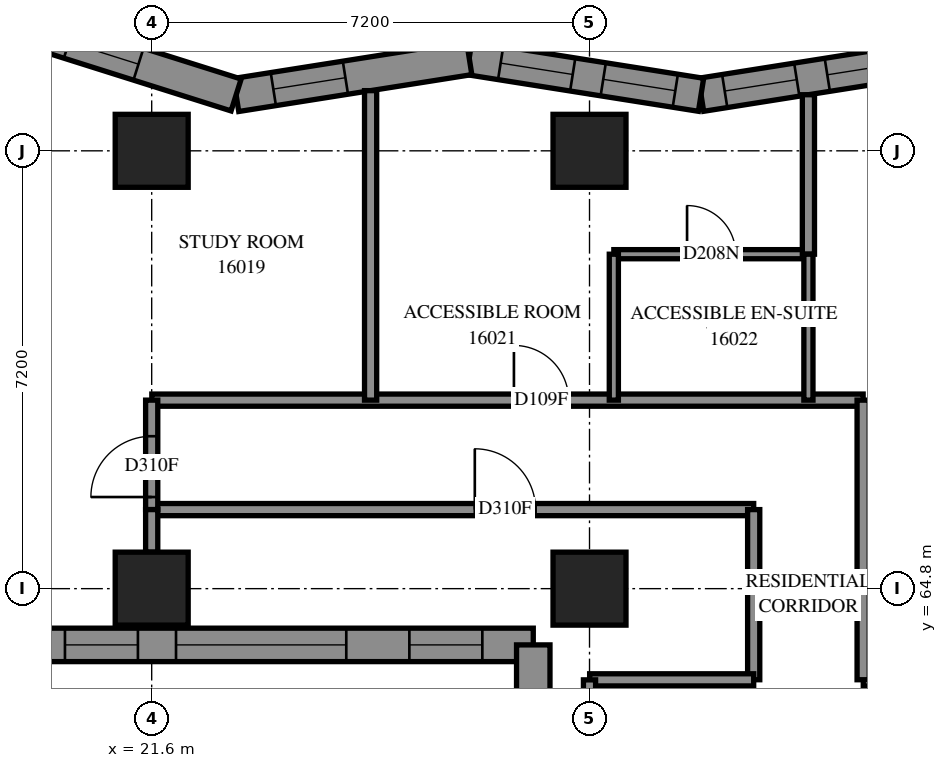
"""IFC4 building model, lengths in metres.
Left out: names, types, materials, properties, quantities, classifications, styles, units other than length and angle.
Written with IfcOpenShell. Run it as: python <this file> out.ifc"""

import sys

from ifc_helpers import new_model, si_unit, direction, frame, frame_2d, origin, origin_2d, place, context, subcontext, project, spatial, polyline, rectangle, outline, extrude, element, fill, save


model = new_model("IFC4")
c1 = context("Model", 3, precision=1e-05, world=origin(), true_north=direction((0.0, 1.0)))
c2 = subcontext(c1, "Body", "Model", "MODEL_VIEW")
j1 = project(units=[si_unit("LENGTHUNIT", "METRE"), si_unit("PLANEANGLEUNIT", "RADIAN")], contexts=[c1])
p1 = place(None, origin())
s1 = spatial("IfcSite", under=j1, at=p1, CompositionType="ELEMENT")
p2 = place(p1, origin())
s2 = spatial("IfcBuilding", under=s1, at=p2, CompositionType="ELEMENT")
p3 = place(p2, frame((0.0, 0.0, 61.0)))
s3 = spatial("IfcBuildingStorey", under=s2, at=p3, CompositionType="ELEMENT", Elevation=61.0)
for number, where, z_axis, x_axis in (
    (1, (21.6, 64.8, 0.0), (0.0, 0.0, 1.0), (1.0, 0.0, 0.0)),
    (2, (21.6, 72.0, 0.0), (0.0, 0.0, 1.0), (1.0, 0.0, 0.0)),
    (3, (28.8, 64.8, 0.0), (0.0, 0.0, 1.0), (1.0, 0.0, 0.0)),
    (4, (28.8, 72.0, 0.0), (0.0, 0.0, 1.0), (1.0, 0.0, 0.0)),
):
    element("IfcColumn", number, at=place(p3, frame(where, z_axis=z_axis, x_axis=x_axis)), inside=s3, PredefinedType="COLUMN", context=c2, shape_type="SweptSolid", body=[
        extrude(rectangle(XDim=1.2, YDim=1.2, at=origin_2d()), origin(), (0.0, 0.0, 1.0), 3.1),
    ])
p4 = place(p3, frame((34.447, 73.525, 0.0), z_axis=(0.0, 0.0, 1.0), x_axis=(-0.9877213372, -0.1562259905, 0.0)))
e5 = element("IfcWall", 5, at=p4, inside=s3, PredefinedType="SOLIDWALL", context=c2, shape_type="SweptSolid", body=[
    extrude(outline(polyline([(-0.043, -0.275), (3.816, -0.275), (3.903, 0.275), (0.043, 0.275), (-0.043, -0.275)])), origin(), (0.0, 0.0, 1.0), 3.1),
])
p5 = place(p4, frame((0.558, 0.0, 0.5)))
e6 = element("IfcOpeningElement", 6, at=p5, cuts=e5, PredefinedType="OPENING", context=c2, shape_type="SweptSolid", body=[
    extrude(rectangle(XDim=1.2, YDim=2.45, at=frame_2d((0.6, 1.225))), frame((0.0, 0.285, 0.0), z_axis=(0.0, -1.0, 0.0), x_axis=(1.0, 0.0, 0.0)), (0.0, 0.0, 1.0), 0.57),
])
p6 = place(p4, frame((2.266, 0.0, 0.5)))
e7 = element("IfcOpeningElement", 7, at=p6, cuts=e5, PredefinedType="OPENING", context=c2, shape_type="SweptSolid", body=[
    extrude(rectangle(XDim=1.2, YDim=2.45, at=frame_2d((0.6, 1.225))), frame((0.0, 0.285, 0.0), z_axis=(0.0, -1.0, 0.0), x_axis=(1.0, 0.0, 0.0)), (0.0, 0.0, 1.0), 0.57),
])
p7 = place(p3, frame((30.634, 72.922, 0.0), z_axis=(0.0, 0.0, 1.0), x_axis=(-0.9877213372, 0.1562259905, 0.0)))
e8 = element("IfcWall", 8, at=p7, inside=s3, PredefinedType="SOLIDWALL", context=c2, shape_type="SweptSolid", body=[
    extrude(outline(polyline([(0.043, -0.275), (3.903, -0.275), (3.816, 0.275), (-0.043, 0.275), (0.043, -0.275)])), origin(), (0.0, 0.0, 1.0), 3.1),
])
p8 = place(p7, frame((0.428, 0.0, 0.5)))
e9 = element("IfcOpeningElement", 9, at=p8, cuts=e8, PredefinedType="OPENING", context=c2, shape_type="SweptSolid", body=[
    extrude(rectangle(XDim=1.2, YDim=2.45, at=frame_2d((0.6, 1.225))), frame((0.0, 0.285, 0.0), z_axis=(0.0, -1.0, 0.0), x_axis=(1.0, 0.0, 0.0)), (0.0, 0.0, 1.0), 0.57),
])
p9 = place(p7, frame((2.137, 0.0, 0.5)))
e10 = element("IfcOpeningElement", 10, at=p9, cuts=e8, PredefinedType="OPENING", context=c2, shape_type="SweptSolid", body=[
    extrude(rectangle(XDim=1.2, YDim=2.45, at=frame_2d((0.6, 1.225))), frame((0.0, 0.285, 0.0), z_axis=(0.0, -1.0, 0.0), x_axis=(1.0, 0.0, 0.0)), (0.0, 0.0, 1.0), 0.57),
])
p10 = place(p3, frame((26.822, 73.525, 0.0), z_axis=(0.0, 0.0, 1.0), x_axis=(-0.9877221932, -0.1562205785, 0.0)))
e11 = element("IfcWall", 11, at=p10, inside=s3, PredefinedType="SOLIDWALL", context=c2, shape_type="SweptSolid", body=[
    extrude(outline(polyline([(-0.043, -0.275), (3.816, -0.275), (3.946, 0.275), (0.043, 0.275), (-0.043, -0.275)])), origin(), (0.0, 0.0, 1.0), 3.1),
])
p11 = place(p10, frame((2.062, 0.0, 0.5)))
e12 = element("IfcOpeningElement", 12, at=p11, cuts=e11, PredefinedType="OPENING", context=c2, shape_type="SweptSolid", body=[
    extrude(rectangle(XDim=1.2, YDim=2.45, at=frame_2d((0.6, 1.225))), frame((0.0, 0.285, 0.0), z_axis=(0.0, -1.0, 0.0), x_axis=(1.0, 0.0, 0.0)), (0.0, 0.0, 1.0), 0.57),
])
p12 = place(p3, frame((22.988, 72.918, 0.0), z_axis=(0.0, 0.0, 1.0), x_axis=(-0.9536482224, 0.3009236912, 0.0)))
e13 = element("IfcWall", 13, at=p12, inside=s3, PredefinedType="SOLIDWALL", context=c2, shape_type="SweptSolid", body=[
    extrude(outline(polyline([(0.065, -0.275), (4.062, -0.275), (3.312, 0.275), (-0.065, 0.275), (0.065, -0.275)])), origin(), (0.0, 0.0, 1.0), 3.1),
])
p13 = place(p12, frame((1.684, 0.0, 0.5)))
e14 = element("IfcOpeningElement", 14, at=p13, cuts=e13, PredefinedType="OPENING", context=c2, shape_type="SweptSolid", body=[
    extrude(rectangle(XDim=1.2, YDim=2.45, at=frame_2d((0.6, 1.225))), frame((0.0, 0.285, 0.0), z_axis=(0.0, -1.0, 0.0), x_axis=(1.0, 0.0, 0.0)), (0.0, 0.0, 1.0), 0.57),
])
p14 = place(p3, frame((19.472, 63.875, 0.0), z_axis=(0.0, 0.0, 1.0), x_axis=(1.0, 0.0, 0.0)))
e15 = element("IfcWall", 15, at=p14, inside=s3, PredefinedType="SOLIDWALL", context=c2, shape_type="SweptSolid", body=[
    extrude(outline(polyline([(-0.275, -0.275), (8.128, -0.275), (8.678, 0.275), (0.275, 0.275), (-0.275, -0.275)])), origin(), (0.0, 0.0, 1.0), 3.1),
])
p15 = place(p14, frame((2.528, 0.0, 0.5)))
e16 = element("IfcOpeningElement", 16, at=p15, cuts=e15, PredefinedType="OPENING", context=c2, shape_type="SweptSolid", body=[
    extrude(rectangle(XDim=2.8, YDim=2.45, at=frame_2d((1.4, 1.225))), frame((0.0, 0.285, 0.0), z_axis=(0.0, -1.0, 0.0), x_axis=(1.0, 0.0, 0.0)), (0.0, 0.0, 1.0), 0.57),
])
p16 = place(p14, frame((0.702, 0.0, 0.5)))
e17 = element("IfcOpeningElement", 17, at=p16, cuts=e15, PredefinedType="OPENING", context=c2, shape_type="SweptSolid", body=[
    extrude(rectangle(XDim=1.2, YDim=2.45, at=frame_2d((0.6, 1.225))), frame((0.0, 0.285, 0.0), z_axis=(0.0, -1.0, 0.0), x_axis=(1.0, 0.0, 0.0)), (0.0, 0.0, 1.0), 0.57),
])
p17 = place(p14, frame((6.365, 0.0, 0.5)))
e18 = element("IfcOpeningElement", 18, at=p17, cuts=e15, PredefinedType="OPENING", context=c2, shape_type="SweptSolid", body=[
    extrude(rectangle(XDim=1.2, YDim=2.45, at=frame_2d((0.6, 1.225))), frame((0.0, 0.285, 0.0), z_axis=(0.0, -1.0, 0.0), x_axis=(1.0, 0.0, 0.0)), (0.0, 0.0, 1.0), 0.57),
])
p18 = place(p3, frame((27.875, 63.875, 0.0), z_axis=(0.0, 0.0, 1.0), x_axis=(0.0, -1.0, 0.0)))
e19 = element("IfcWall", 19, at=p18, inside=s3, PredefinedType="SOLIDWALL", context=c2, shape_type="SweptSolid", body=[
    extrude(outline(polyline([(0.275, -0.275), (8.678, -0.275), (8.128, 0.275), (-0.275, 0.275), (0.275, -0.275)])), origin(), (0.0, 0.0, 1.0), 3.1),
])
p19 = place(p18, frame((0.838, 0.0, 0.5)))
e20 = element("IfcOpeningElement", 20, at=p19, cuts=e19, PredefinedType="OPENING", context=c2, shape_type="SweptSolid", body=[
    extrude(rectangle(XDim=1.2, YDim=2.45, at=frame_2d((0.6, 1.225))), frame((0.0, 0.285, 0.0), z_axis=(0.0, -1.0, 0.0), x_axis=(1.0, 0.0, 0.0)), (0.0, 0.0, 1.0), 0.57),
])
p20 = place(p18, frame((6.502, 0.0, 0.5)))
e21 = element("IfcOpeningElement", 21, at=p20, cuts=e19, PredefinedType="OPENING", context=c2, shape_type="SweptSolid", body=[
    extrude(rectangle(XDim=1.2, YDim=2.45, at=frame_2d((0.6, 1.225))), frame((0.0, 0.285, 0.0), z_axis=(0.0, -1.0, 0.0), x_axis=(1.0, 0.0, 0.0)), (0.0, 0.0, 1.0), 0.57),
])
p21 = place(p18, frame((3.325, 0.0, 0.45)))
e22 = element("IfcOpeningElement", 22, at=p21, cuts=e19, PredefinedType="OPENING", context=c2, shape_type="SweptSolid", body=[
    extrude(rectangle(XDim=1.3, YDim=2.5, at=frame_2d((0.65, 1.25))), frame((0.0, 0.285, 0.0), z_axis=(0.0, -1.0, 0.0), x_axis=(1.0, 0.0, 0.0)), (0.0, 0.0, 1.0), 0.57),
])
p22 = place(p18, frame((4.875, 0.0, 0.45)))
e23 = element("IfcOpeningElement", 23, at=p22, cuts=e19, PredefinedType="OPENING", context=c2, shape_type="SweptSolid", body=[
    extrude(rectangle(XDim=1.0, YDim=2.5, at=frame_2d((0.5, 1.25))), frame((0.0, 0.285, 0.0), z_axis=(0.0, -1.0, 0.0), x_axis=(1.0, 0.0, 0.0)), (0.0, 0.0, 1.0), 0.57),
])
p23 = place(p3, frame((33.302, 63.3, 0.0), z_axis=(0.0, 0.0, 1.0), x_axis=(1.0, 0.0, 0.0)))
e24 = element("IfcWall", 24, at=p23, inside=s3, PredefinedType="PARTITIONING", context=c2, shape_type="SweptSolid", body=[
    extrude(rectangle(XDim=21.798, YDim=0.2, at=frame_2d((10.899, 0.0))), origin(), (0.0, 0.0, 1.0), 3.1),
])
p24 = place(p23, frame((1.091, 0.0, 0.0)))
e25 = element("IfcOpeningElement", 25, at=p24, cuts=e24, PredefinedType="OPENING", context=c2, shape_type="SweptSolid", body=[
    extrude(rectangle(XDim=0.9, YDim=2.1, at=frame_2d((0.45, 1.05))), frame((0.0, 0.11, 0.0), z_axis=(0.0, -1.0, 0.0), x_axis=(1.0, 0.0, 0.0)), (0.0, 0.0, 1.0), 0.22),
])
p25 = place(p23, frame((8.248, 0.0, 0.0)))
e26 = element("IfcOpeningElement", 26, at=p25, cuts=e24, PredefinedType="OPENING", context=c2, shape_type="SweptSolid", body=[
    extrude(rectangle(XDim=0.9, YDim=2.1, at=frame_2d((0.45, 1.05))), frame((0.0, 0.11, 0.0), z_axis=(0.0, -1.0, 0.0), x_axis=(1.0, 0.0, 0.0)), (0.0, 0.0, 1.0), 0.22),
])
p26 = place(p23, frame((15.448, 0.0, 0.0)))
e27 = element("IfcOpeningElement", 27, at=p26, cuts=e24, PredefinedType="OPENING", context=c2, shape_type="SweptSolid", body=[
    extrude(rectangle(XDim=0.9, YDim=2.1, at=frame_2d((0.45, 1.05))), frame((0.0, 0.11, 0.0), z_axis=(0.0, -1.0, 0.0), x_axis=(1.0, 0.0, 0.0)), (0.0, 0.0, 1.0), 0.22),
])
p27 = place(p3, frame((21.602, 67.9, 0.0), z_axis=(0.0, 0.0, 1.0), x_axis=(1.0, 0.0, 0.0)))
e28 = element("IfcWall", 28, at=p27, inside=s3, PredefinedType="PARTITIONING", context=c2, shape_type="SweptSolid", body=[
    extrude(rectangle(XDim=11.698, YDim=0.2, at=frame_2d((5.849, 0.0))), origin(), (0.0, 0.0, 1.0), 3.1),
])
p28 = place(p27, frame((5.955, 0.0, 0.0)))
e29 = element("IfcOpeningElement", 29, at=p28, cuts=e28, PredefinedType="OPENING", context=c2, shape_type="SweptSolid", body=[
    extrude(rectangle(XDim=0.9, YDim=2.1, at=frame_2d((0.45, 1.05))), frame((0.0, 0.11, 0.0), z_axis=(0.0, -1.0, 0.0), x_axis=(1.0, 0.0, 0.0)), (0.0, 0.0, 1.0), 0.22),
])
p29 = place(p3, frame((21.6, 66.1, 0.0), z_axis=(0.0, 0.0, 1.0), x_axis=(1.0, 0.0, 0.0)))
e30 = element("IfcWall", 30, at=p29, inside=s3, PredefinedType="PARTITIONING", context=c2, shape_type="SweptSolid", body=[
    extrude(rectangle(XDim=9.9, YDim=0.2, at=frame_2d((4.95, 0.0))), origin(), (0.0, 0.0, 1.0), 3.1),
])
p30 = place(p29, frame((5.314, 0.0, 0.0)))
e31 = element("IfcOpeningElement", 31, at=p30, cuts=e30, PredefinedType="OPENING", context=c2, shape_type="SweptSolid", body=[
    extrude(rectangle(XDim=1.0, YDim=2.1, at=frame_2d((0.5, 1.05))), frame((0.0, 0.11, 0.0), z_axis=(0.0, -1.0, 0.0), x_axis=(1.0, 0.0, 0.0)), (0.0, 0.0, 1.0), 0.22),
])
p31 = place(p3, frame((25.2, 67.9, 0.0), z_axis=(0.0, 0.0, 1.0), x_axis=(0.0, 1.0, 0.0)))
e32 = element("IfcWall", 32, at=p31, inside=s3, PredefinedType="PARTITIONING", context=c2, shape_type="SweptSolid", body=[
    extrude(rectangle(XDim=5.09, YDim=0.2, at=frame_2d((2.545, 0.0))), origin(), (0.0, 0.0, 1.0), 3.1),
])
p32 = place(p3, frame((33.3, 63.302, 0.0), z_axis=(0.0, 0.0, 1.0), x_axis=(0.0, 1.0, 0.0)))
e33 = element("IfcWall", 33, at=p32, inside=s3, PredefinedType="PARTITIONING", context=c2, shape_type="SweptSolid", body=[
    extrude(rectangle(XDim=4.598, YDim=0.2, at=frame_2d((2.299, 0.0))), origin(), (0.0, 0.0, 1.0), 3.1),
])
p33 = place(p3, frame((29.2, 70.3, 0.0), z_axis=(0.0, 0.0, 1.0), x_axis=(1.0, 0.0, 0.0)))
e34 = element("IfcWall", 34, at=p33, inside=s3, PredefinedType="PARTITIONING", context=c2, shape_type="SweptSolid", body=[
    extrude(rectangle(XDim=3.2, YDim=0.15, at=frame_2d((1.6, 0.0))), origin(), (0.0, 0.0, 1.0), 3.1),
])
p34 = place(p33, frame((1.204, 0.0, 0.0)))
e35 = element("IfcOpeningElement", 35, at=p34, cuts=e34, PredefinedType="OPENING", context=c2, shape_type="SweptSolid", body=[
    extrude(rectangle(XDim=0.8, YDim=2.1, at=frame_2d((0.4, 1.05))), frame((0.0, 0.085, 0.0), z_axis=(0.0, -1.0, 0.0), x_axis=(1.0, 0.0, 0.0)), (0.0, 0.0, 1.0), 0.17),
])
p35 = place(p3, frame((31.5, 63.302, 0.0), z_axis=(0.0, 0.0, 1.0), x_axis=(0.0, 1.0, 0.0)))
e36 = element("IfcWall", 36, at=p35, inside=s3, PredefinedType="PARTITIONING", context=c2, shape_type="SweptSolid", body=[
    extrude(rectangle(XDim=2.798, YDim=0.2, at=frame_2d((1.399, 0.0))), origin(), (0.0, 0.0, 1.0), 3.1),
])
p36 = place(p3, frame((28.802, 63.3, 0.0), z_axis=(0.0, 0.0, 1.0), x_axis=(1.0, 0.0, 0.0)))
e37 = element("IfcWall", 37, at=p36, inside=s3, PredefinedType="PARTITIONING", context=c2, shape_type="SweptSolid", body=[
    extrude(rectangle(XDim=2.698, YDim=0.2, at=frame_2d((1.349, 0.0))), origin(), (0.0, 0.0, 1.0), 3.1),
])
p37 = place(p3, frame((32.4, 70.3, 0.0), z_axis=(0.0, 0.0, 1.0), x_axis=(0.0, 1.0, 0.0)))
e38 = element("IfcWall", 38, at=p37, inside=s3, PredefinedType="PARTITIONING", context=c2, shape_type="SweptSolid", body=[
    extrude(rectangle(XDim=2.623, YDim=0.2, at=frame_2d((1.311, 0.0))), origin(), (0.0, 0.0, 1.0), 3.1),
])
for number, where, z_axis, x_axis in (
    (39, (29.2, 67.9, 0.0), (0.0, 0.0, 1.0), (0.0, 1.0, 0.0)),
    (40, (32.4, 67.9, 0.0), (0.0, 0.0, 1.0), (0.0, 1.0, 0.0)),
):
    element("IfcWall", number, at=place(p3, frame(where, z_axis=z_axis, x_axis=x_axis)), inside=s3, PredefinedType="PARTITIONING", context=c2, shape_type="SweptSolid", body=[
        extrude(rectangle(XDim=2.4, YDim=0.15, at=frame_2d((1.2, 0.0))), origin(), (0.0, 0.0, 1.0), 3.1),
    ])
p38 = place(p3, frame((21.6, 66.1, 0.0), z_axis=(0.0, 0.0, 1.0), x_axis=(0.0, 1.0, 0.0)))
e41 = element("IfcWall", 41, at=p38, inside=s3, PredefinedType="PARTITIONING", context=c2, shape_type="SweptSolid", body=[
    extrude(rectangle(XDim=1.8, YDim=0.2, at=frame_2d((0.9, 0.0))), origin(), (0.0, 0.0, 1.0), 2.6),
])
p39 = place(p38, frame((0.207, 0.0, 0.0)))
e42 = element("IfcOpeningElement", 42, at=p39, cuts=e41, PredefinedType="OPENING", context=c2, shape_type="SweptSolid", body=[
    extrude(rectangle(XDim=1.0, YDim=2.1, at=frame_2d((0.5, 1.05))), frame((0.0, 0.11, 0.0), z_axis=(0.0, -1.0, 0.0), x_axis=(1.0, 0.0, 0.0)), (0.0, 0.0, 1.0), 0.22),
])
p40 = place(p3, frame((28.8, 61.5, 0.0), z_axis=(0.0, 0.0, 1.0), x_axis=(0.0, 1.0, 0.0)))
e43 = element("IfcWall", 43, at=p40, inside=s3, PredefinedType="PARTITIONING", context=c2, shape_type="SweptSolid", body=[
    extrude(rectangle(XDim=1.8, YDim=0.2, at=frame_2d((0.9, 0.0))), origin(), (0.0, 0.0, 1.0), 2.6),
])
p41 = place(p3, frame((21.6, 65.4, 0.0), z_axis=(0.0, 0.0, 1.0), x_axis=(0.0, 1.0, 0.0)))
e44 = element("IfcWall", 44, at=p41, inside=s3, PredefinedType="PARTITIONING", context=c2, shape_type="SweptSolid", body=[
    extrude(rectangle(XDim=0.7, YDim=0.2, at=frame_2d((0.35, 0.0))), origin(), (0.0, 0.0, 1.0), 2.6),
])
p42 = place(p5, origin())
e45 = element("IfcWindow", 45, at=p42, inside=s3, PartitioningType="SINGLE_PANEL", PredefinedType="WINDOW", context=c2, shape_type="SweptSolid", body=[
    extrude(rectangle(XDim=1.2, YDim=2.45, at=frame_2d((0.6, 1.225))), frame((0.0, 0.155, 0.0), z_axis=(0.0, -1.0, 0.0), x_axis=(1.0, 0.0, 0.0)), (0.0, 0.0, 1.0), 0.06),
])
fill(e6, e45)
p43 = place(p6, origin())
e46 = element("IfcWindow", 46, at=p43, inside=s3, PartitioningType="SINGLE_PANEL", PredefinedType="WINDOW", context=c2, shape_type="SweptSolid", body=[
    extrude(rectangle(XDim=1.2, YDim=2.45, at=frame_2d((0.6, 1.225))), frame((0.0, 0.155, 0.0), z_axis=(0.0, -1.0, 0.0), x_axis=(1.0, 0.0, 0.0)), (0.0, 0.0, 1.0), 0.06),
])
fill(e7, e46)
p44 = place(p8, origin())
e47 = element("IfcWindow", 47, at=p44, inside=s3, PartitioningType="SINGLE_PANEL", PredefinedType="WINDOW", context=c2, shape_type="SweptSolid", body=[
    extrude(rectangle(XDim=1.2, YDim=2.45, at=frame_2d((0.6, 1.225))), frame((0.0, 0.155, 0.0), z_axis=(0.0, -1.0, 0.0), x_axis=(1.0, 0.0, 0.0)), (0.0, 0.0, 1.0), 0.06),
])
fill(e9, e47)
p45 = place(p9, origin())
e48 = element("IfcWindow", 48, at=p45, inside=s3, PartitioningType="SINGLE_PANEL", PredefinedType="WINDOW", context=c2, shape_type="SweptSolid", body=[
    extrude(rectangle(XDim=1.2, YDim=2.45, at=frame_2d((0.6, 1.225))), frame((0.0, 0.155, 0.0), z_axis=(0.0, -1.0, 0.0), x_axis=(1.0, 0.0, 0.0)), (0.0, 0.0, 1.0), 0.06),
])
fill(e10, e48)
p46 = place(p11, origin())
e49 = element("IfcWindow", 49, at=p46, inside=s3, PartitioningType="SINGLE_PANEL", PredefinedType="WINDOW", context=c2, shape_type="SweptSolid", body=[
    extrude(rectangle(XDim=1.2, YDim=2.45, at=frame_2d((0.6, 1.225))), frame((0.0, 0.155, 0.0), z_axis=(0.0, -1.0, 0.0), x_axis=(1.0, 0.0, 0.0)), (0.0, 0.0, 1.0), 0.06),
])
fill(e12, e49)
p47 = place(p13, origin())
e50 = element("IfcWindow", 50, at=p47, inside=s3, PartitioningType="SINGLE_PANEL", PredefinedType="WINDOW", context=c2, shape_type="SweptSolid", body=[
    extrude(rectangle(XDim=1.2, YDim=2.45, at=frame_2d((0.6, 1.225))), frame((0.0, 0.155, 0.0), z_axis=(0.0, -1.0, 0.0), x_axis=(1.0, 0.0, 0.0)), (0.0, 0.0, 1.0), 0.06),
])
fill(e14, e50)
p48 = place(p15, origin())
e51 = element("IfcWindow", 51, at=p48, inside=s3, PartitioningType="SINGLE_PANEL", PredefinedType="WINDOW", context=c2, shape_type="SweptSolid", body=[
    extrude(rectangle(XDim=2.8, YDim=2.45, at=frame_2d((1.4, 1.225))), frame((0.0, 0.155, 0.0), z_axis=(0.0, -1.0, 0.0), x_axis=(1.0, 0.0, 0.0)), (0.0, 0.0, 1.0), 0.06),
])
fill(e16, e51)
p49 = place(p16, origin())
e52 = element("IfcWindow", 52, at=p49, inside=s3, PartitioningType="SINGLE_PANEL", PredefinedType="WINDOW", context=c2, shape_type="SweptSolid", body=[
    extrude(rectangle(XDim=1.2, YDim=2.45, at=frame_2d((0.6, 1.225))), frame((0.0, 0.155, 0.0), z_axis=(0.0, -1.0, 0.0), x_axis=(1.0, 0.0, 0.0)), (0.0, 0.0, 1.0), 0.06),
])
fill(e17, e52)
p50 = place(p17, origin())
e53 = element("IfcWindow", 53, at=p50, inside=s3, PartitioningType="SINGLE_PANEL", PredefinedType="WINDOW", context=c2, shape_type="SweptSolid", body=[
    extrude(rectangle(XDim=1.2, YDim=2.45, at=frame_2d((0.6, 1.225))), frame((0.0, 0.155, 0.0), z_axis=(0.0, -1.0, 0.0), x_axis=(1.0, 0.0, 0.0)), (0.0, 0.0, 1.0), 0.06),
])
fill(e18, e53)
p51 = place(p39, origin())
e54 = element("IfcDoor", 54, at=p51, inside=s3, OperationType="SINGLE_SWING_RIGHT", PredefinedType="DOOR", context=c2, shape_type="SweptSolid", body=[
    extrude(rectangle(XDim=1.0, YDim=2.1, at=frame_2d((0.5, 1.05))), frame((0.0, 0.025, 0.0), z_axis=(0.0, -1.0, 0.0), x_axis=(1.0, 0.0, 0.0)), (0.0, 0.0, 1.0), 0.05),
])
fill(e42, e54)
p52 = place(p30, origin())
e55 = element("IfcDoor", 55, at=p52, inside=s3, OperationType="SINGLE_SWING_LEFT", PredefinedType="DOOR", context=c2, shape_type="SweptSolid", body=[
    extrude(rectangle(XDim=1.0, YDim=2.1, at=frame_2d((0.5, 1.05))), frame((0.0, 0.025, 0.0), z_axis=(0.0, -1.0, 0.0), x_axis=(1.0, 0.0, 0.0)), (0.0, 0.0, 1.0), 0.05),
])
fill(e31, e55)
p53 = place(p28, origin())
e56 = element("IfcDoor", 56, at=p53, inside=s3, OperationType="SINGLE_SWING_LEFT", PredefinedType="DOOR", context=c2, shape_type="SweptSolid", body=[
    extrude(rectangle(XDim=0.9, YDim=2.1, at=frame_2d((0.45, 1.05))), frame((0.0, 0.025, 0.0), z_axis=(0.0, -1.0, 0.0), x_axis=(1.0, 0.0, 0.0)), (0.0, 0.0, 1.0), 0.05),
])
fill(e29, e56)
p54 = place(p34, origin())
e57 = element("IfcDoor", 57, at=p54, inside=s3, OperationType="SINGLE_SWING_RIGHT", PredefinedType="DOOR", context=c2, shape_type="SweptSolid", body=[
    extrude(rectangle(XDim=0.8, YDim=2.1, at=frame_2d((0.4, 1.05))), frame((0.0, 0.025, 0.0), z_axis=(0.0, -1.0, 0.0), x_axis=(1.0, 0.0, 0.0)), (0.0, 0.0, 1.0), 0.05),
])
fill(e35, e57)
save(model, sys.argv[1])
